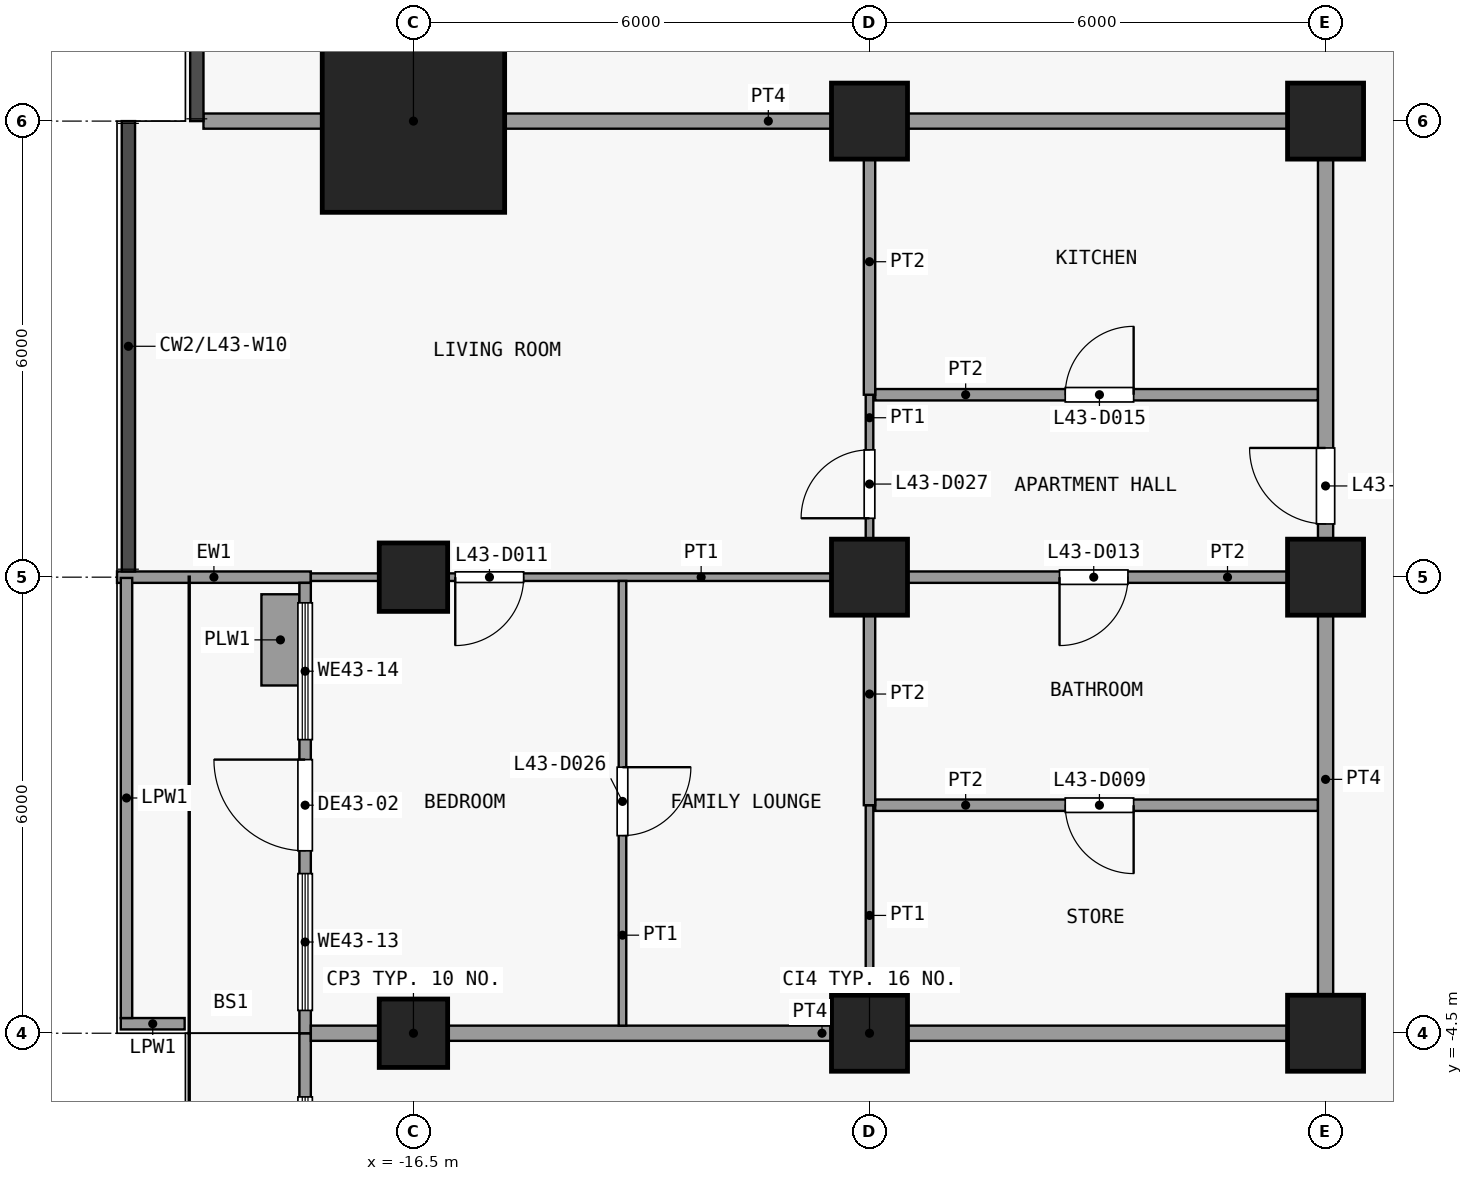
"""IFC4 building model, lengths in metres.
Left out: names, types, materials, properties, quantities, classifications, styles, units other than length and angle.
Written with IfcOpenShell. Run it as: python <this file> out.ifc"""

import sys

from ifc_helpers import new_model, si_unit, direction, frame, frame_2d, origin, origin_2d, place, context, subcontext, project, spatial, rectangle, extrude, element, fill, save


model = new_model("IFC4")
c1 = context("Model", 3, precision=1e-05, world=origin(), true_north=direction((0.0, 1.0)))
c2 = subcontext(c1, "Body", "Model", "MODEL_VIEW")
j1 = project(units=[si_unit("LENGTHUNIT", "METRE"), si_unit("PLANEANGLEUNIT", "RADIAN")], contexts=[c1])
p1 = place(None, origin())
s1 = spatial("IfcSite", under=j1, at=p1, CompositionType="ELEMENT")
p2 = place(p1, origin())
s2 = spatial("IfcBuilding", under=s1, at=p2, CompositionType="ELEMENT")
p3 = place(p2, frame((0.0, 0.0, 174.5)))
s3 = spatial("IfcBuildingStorey", under=s2, at=p3, CompositionType="ELEMENT", Elevation=174.5)
for number, where, z_axis, x_axis in (
    (1, (-16.5, -4.5, 0.0), (0.0, 0.0, 1.0), (1.0, 0.0, 0.0)),
    (2, (-16.5, 1.5, 0.0), (0.0, 0.0, 1.0), (1.0, 0.0, 0.0)),
):
    element("IfcColumn", number, at=place(p3, frame(where, z_axis=z_axis, x_axis=x_axis)), inside=s3, PredefinedType="COLUMN", context=c2, shape_type="SweptSolid", body=[
        extrude(rectangle(XDim=0.9, YDim=0.9, at=origin_2d()), origin(), (0.0, 0.0, 1.0), 3.6),
    ])
p4 = place(p3, frame((-16.5, 7.5, 0.0), z_axis=(0.0, 0.0, 1.0), x_axis=(1.0, 0.0, 0.0)))
e3 = element("IfcColumn", 3, at=p4, inside=s3, PredefinedType="COLUMN", context=c2, shape_type="SweptSolid", body=[
    extrude(rectangle(XDim=2.4, YDim=2.4, at=origin_2d()), origin(), (0.0, 0.0, 1.0), 3.6),
])
for number, where, z_axis, x_axis in (
    (4, (-10.5, -4.5, 0.0), (0.0, 0.0, 1.0), (1.0, 0.0, 0.0)),
    (5, (-10.5, 1.5, 0.0), (0.0, 0.0, 1.0), (1.0, 0.0, 0.0)),
    (6, (-10.5, 7.5, 0.0), (0.0, 0.0, 1.0), (1.0, 0.0, 0.0)),
    (7, (-4.5, -4.5, 0.0), (0.0, 0.0, 1.0), (1.0, 0.0, 0.0)),
    (8, (-4.5, 1.5, 0.0), (0.0, 0.0, 1.0), (1.0, 0.0, 0.0)),
    (9, (-4.5, 7.5, 0.0), (0.0, 0.0, 1.0), (1.0, 0.0, 0.0)),
):
    element("IfcColumn", number, at=place(p3, frame(where, z_axis=z_axis, x_axis=x_axis)), inside=s3, PredefinedType="COLUMN", context=c2, shape_type="SweptSolid", body=[
        extrude(rectangle(XDim=1.0, YDim=1.0, at=origin_2d()), origin(), (0.0, 0.0, 1.0), 3.6),
    ])
p5 = place(p3, frame((-17.925, -13.425, 0.0), z_axis=(0.0, 0.0, 1.0), x_axis=(0.0, 1.0, 0.0)))
e10 = element("IfcWall", 10, at=p5, inside=s3, PredefinedType="SOLIDWALL", context=c2, shape_type="SweptSolid", body=[
    extrude(rectangle(XDim=8.925, YDim=0.15, at=frame_2d((4.462, 0.0))), origin(), (0.0, 0.0, 1.0), 3.3),
])
p6 = place(p5, frame((3.05, 0.0, 0.0)))
e11 = element("IfcOpeningElement", 11, at=p6, cuts=e10, PredefinedType="OPENING", context=c2, shape_type="SweptSolid", body=[
    extrude(rectangle(XDim=1.2, YDim=2.4, at=frame_2d((0.6, 1.2))), frame((0.0, 0.085, 0.0), z_axis=(0.0, -1.0, 0.0), x_axis=(1.0, 0.0, 0.0)), (0.0, 0.0, 1.0), 0.17),
])
p7 = place(p5, frame((0.25, 0.0, 0.9)))
e12 = element("IfcOpeningElement", 12, at=p7, cuts=e10, PredefinedType="OPENING", context=c2, shape_type="SweptSolid", body=[
    extrude(rectangle(XDim=2.05, YDim=2.1, at=frame_2d((1.025, 1.05))), frame((0.0, 0.085, 0.0), z_axis=(0.0, -1.0, 0.0), x_axis=(1.0, 0.0, 0.0)), (0.0, 0.0, 1.0), 0.17),
])
p8 = place(p5, frame((5.775, 0.0, 0.9)))
e13 = element("IfcOpeningElement", 13, at=p8, cuts=e10, PredefinedType="OPENING", context=c2, shape_type="SweptSolid", body=[
    extrude(rectangle(XDim=2.312, YDim=2.1, at=frame_2d((1.156, 1.05))), frame((0.0, 0.085, 0.0), z_axis=(0.0, -1.0, 0.0), x_axis=(1.0, 0.0, 0.0)), (0.0, 0.0, 1.0), 0.17),
])
p9 = place(p3, frame((-17.85, 1.5, 0.0), z_axis=(0.0, 0.0, 1.0), x_axis=(-1.0, 0.0, 0.0)))
e14 = element("IfcWall", 14, at=p9, inside=s3, PredefinedType="SOLIDWALL", context=c2, shape_type="SweptSolid", body=[
    extrude(rectangle(XDim=2.55, YDim=0.15, at=frame_2d((1.275, 0.0))), origin(), (0.0, 0.0, 1.0), 3.3),
])
p10 = place(p3, frame((-17.925, -4.5, 0.0), z_axis=(0.0, 0.0, 1.0), x_axis=(0.0, 1.0, 0.0)))
e15 = element("IfcWall", 15, at=p10, inside=s3, PredefinedType="SOLIDWALL", context=c2, shape_type="SweptSolid", body=[
    extrude(rectangle(XDim=5.925, YDim=0.15, at=frame_2d((2.962, 0.0))), origin(), (0.0, 0.0, 1.0), 3.3),
])
p11 = place(p10, frame((2.4, 0.0, 0.0)))
e16 = element("IfcOpeningElement", 16, at=p11, cuts=e15, PredefinedType="OPENING", context=c2, shape_type="SweptSolid", body=[
    extrude(rectangle(XDim=1.2, YDim=2.4, at=frame_2d((0.6, 1.2))), frame((0.0, 0.085, 0.0), z_axis=(0.0, -1.0, 0.0), x_axis=(1.0, 0.0, 0.0)), (0.0, 0.0, 1.0), 0.17),
])
p12 = place(p10, frame((0.3, 0.0, 0.9)))
e17 = element("IfcOpeningElement", 17, at=p12, cuts=e15, PredefinedType="OPENING", context=c2, shape_type="SweptSolid", body=[
    extrude(rectangle(XDim=1.8, YDim=2.1, at=frame_2d((0.9, 1.05))), frame((0.0, 0.085, 0.0), z_axis=(0.0, -1.0, 0.0), x_axis=(1.0, 0.0, 0.0)), (0.0, 0.0, 1.0), 0.17),
])
p13 = place(p10, frame((3.863, 0.0, 0.9)))
e18 = element("IfcOpeningElement", 18, at=p13, cuts=e15, PredefinedType="OPENING", context=c2, shape_type="SweptSolid", body=[
    extrude(rectangle(XDim=1.8, YDim=2.1, at=frame_2d((0.9, 1.05))), frame((0.0, 0.085, 0.0), z_axis=(0.0, -1.0, 0.0), x_axis=(1.0, 0.0, 0.0)), (0.0, 0.0, 1.0), 0.17),
])
p14 = place(p3, frame((-18.25, 0.075, 0.0), z_axis=(0.0, 0.0, 1.0), x_axis=(0.0, 1.0, 0.0)))
e19 = element("IfcWall", 19, at=p14, inside=s3, PredefinedType="USERDEFINED", context=c2, shape_type="SweptSolid", body=[
    extrude(rectangle(XDim=1.2, YDim=0.5, at=frame_2d((0.6, 0.0))), origin(), (0.0, 0.0, 1.0), 0.9),
])
p15 = place(p3, frame((-19.51, -4.375, 0.0), z_axis=(0.0, 0.0, 1.0), x_axis=(-1.0, 0.0, 0.0)))
e20 = element("IfcWall", 20, at=p15, inside=s3, PredefinedType="PARAPET", context=c2, shape_type="SweptSolid", body=[
    extrude(rectangle(XDim=0.84, YDim=0.15, at=frame_2d((0.42, 0.0))), origin(), (0.0, 0.0, 1.0), 1.15),
])
p16 = place(p3, frame((-20.275, -4.3, 0.0), z_axis=(0.0, 0.0, 1.0), x_axis=(0.0, 1.0, 0.0)))
e21 = element("IfcWall", 21, at=p16, inside=s3, PredefinedType="PARAPET", context=c2, shape_type="SweptSolid", body=[
    extrude(rectangle(XDim=5.79, YDim=0.15, at=frame_2d((2.895, 0.0))), origin(), (0.0, 0.0, 1.0), 1.15),
])
p17 = place(p3, frame((-17.85, -4.5, 0.0), z_axis=(0.0, 0.0, 1.0), x_axis=(1.0, 0.0, 0.0)))
e22 = element("IfcWall", 22, at=p17, inside=s3, PredefinedType="PARTITIONING", context=c2, shape_type="SweptSolid", body=[
    extrude(rectangle(XDim=13.45, YDim=0.2, at=frame_2d((6.725, 0.0))), origin(), (0.0, 0.0, 1.0), 3.3),
])
p18 = place(p3, frame((-10.425, -1.5, 0.0), z_axis=(0.0, 0.0, 1.0), x_axis=(1.0, 0.0, 0.0)))
e23 = element("IfcWall", 23, at=p18, inside=s3, PredefinedType="PARTITIONING", context=c2, shape_type="SweptSolid", body=[
    extrude(rectangle(XDim=5.825, YDim=0.15, at=frame_2d((2.913, 0.0))), origin(), (0.0, 0.0, 1.0), 3.3),
])
p19 = place(p18, frame((2.5, 0.0, 0.0)))
e24 = element("IfcOpeningElement", 24, at=p19, cuts=e23, PredefinedType="OPENING", context=c2, shape_type="SweptSolid", body=[
    extrude(rectangle(XDim=0.9, YDim=2.1, at=frame_2d((0.45, 1.05))), frame((0.0, 0.085, 0.0), z_axis=(0.0, -1.0, 0.0), x_axis=(1.0, 0.0, 0.0)), (0.0, 0.0, 1.0), 0.17),
])
p20 = place(p3, frame((-17.85, 1.5, 0.0), z_axis=(0.0, 0.0, 1.0), x_axis=(1.0, 0.0, 0.0)))
e25 = element("IfcWall", 25, at=p20, inside=s3, PredefinedType="PARTITIONING", context=c2, shape_type="SweptSolid", body=[
    extrude(rectangle(XDim=7.35, YDim=0.1, at=frame_2d((3.675, 0.0))), origin(), (0.0, 0.0, 1.0), 3.3),
])
p21 = place(p20, frame((1.9, 0.0, 0.0)))
e26 = element("IfcOpeningElement", 26, at=p21, cuts=e25, PredefinedType="OPENING", context=c2, shape_type="SweptSolid", body=[
    extrude(rectangle(XDim=0.9, YDim=2.1, at=frame_2d((0.45, 1.05))), frame((0.0, 0.06, 0.0), z_axis=(0.0, -1.0, 0.0), x_axis=(1.0, 0.0, 0.0)), (0.0, 0.0, 1.0), 0.12),
])
p22 = place(p3, frame((-10.5, 1.5, 0.0), z_axis=(0.0, 0.0, 1.0), x_axis=(1.0, 0.0, 0.0)))
e27 = element("IfcWall", 27, at=p22, inside=s3, PredefinedType="PARTITIONING", context=c2, shape_type="SweptSolid", body=[
    extrude(rectangle(XDim=5.9, YDim=0.15, at=frame_2d((2.95, 0.0))), origin(), (0.0, 0.0, 1.0), 3.3),
])
p23 = place(p22, frame((2.5, 0.0, 0.0)))
e28 = element("IfcOpeningElement", 28, at=p23, cuts=e27, PredefinedType="OPENING", context=c2, shape_type="SweptSolid", body=[
    extrude(rectangle(XDim=0.9, YDim=2.1, at=frame_2d((0.45, 1.05))), frame((0.0, 0.085, 0.0), z_axis=(0.0, -1.0, 0.0), x_axis=(1.0, 0.0, 0.0)), (0.0, 0.0, 1.0), 0.17),
])
p24 = place(p3, frame((-10.425, 3.9, 0.0), z_axis=(0.0, 0.0, 1.0), x_axis=(1.0, 0.0, 0.0)))
e29 = element("IfcWall", 29, at=p24, inside=s3, PredefinedType="PARTITIONING", context=c2, shape_type="SweptSolid", body=[
    extrude(rectangle(XDim=5.825, YDim=0.15, at=frame_2d((2.913, 0.0))), origin(), (0.0, 0.0, 1.0), 3.3),
])
p25 = place(p24, frame((2.5, 0.0, 0.0)))
e30 = element("IfcOpeningElement", 30, at=p25, cuts=e29, PredefinedType="OPENING", context=c2, shape_type="SweptSolid", body=[
    extrude(rectangle(XDim=0.9, YDim=2.1, at=frame_2d((0.45, 1.05))), frame((0.0, 0.085, 0.0), z_axis=(0.0, -1.0, 0.0), x_axis=(1.0, 0.0, 0.0)), (0.0, 0.0, 1.0), 0.17),
])
p26 = place(p3, frame((-19.262, 7.5, 0.0), z_axis=(0.0, 0.0, 1.0), x_axis=(1.0, 0.0, 0.0)))
e31 = element("IfcWall", 31, at=p26, inside=s3, PredefinedType="PARTITIONING", context=c2, shape_type="SweptSolid", body=[
    extrude(rectangle(XDim=14.863, YDim=0.2, at=frame_2d((7.431, 0.0))), origin(), (0.0, 0.0, 1.0), 3.3),
])
p27 = place(p3, frame((-13.75, -4.4, 0.0), z_axis=(0.0, 0.0, 1.0), x_axis=(0.0, 1.0, 0.0)))
e32 = element("IfcWall", 32, at=p27, inside=s3, PredefinedType="PARTITIONING", context=c2, shape_type="SweptSolid", body=[
    extrude(rectangle(XDim=5.85, YDim=0.1, at=frame_2d((2.925, 0.0))), origin(), (0.0, 0.0, 1.0), 3.3),
])
p28 = place(p27, frame((2.5, 0.0, 0.0)))
e33 = element("IfcOpeningElement", 33, at=p28, cuts=e32, PredefinedType="OPENING", context=c2, shape_type="SweptSolid", body=[
    extrude(rectangle(XDim=0.9, YDim=2.1, at=frame_2d((0.45, 1.05))), frame((0.0, 0.06, 0.0), z_axis=(0.0, -1.0, 0.0), x_axis=(1.0, 0.0, 0.0)), (0.0, 0.0, 1.0), 0.12),
])
p29 = place(p3, frame((-10.5, -4.4, 0.0), z_axis=(0.0, 0.0, 1.0), x_axis=(0.0, 1.0, 0.0)))
e34 = element("IfcWall", 34, at=p29, inside=s3, PredefinedType="PARTITIONING", context=c2, shape_type="SweptSolid", body=[
    extrude(rectangle(XDim=2.9, YDim=0.1, at=frame_2d((1.45, 0.0))), origin(), (0.0, 0.0, 1.0), 3.3),
])
p30 = place(p3, frame((-10.5, 1.575, 0.0), z_axis=(0.0, 0.0, 1.0), x_axis=(0.0, 1.0, 0.0)))
e35 = element("IfcWall", 35, at=p30, inside=s3, PredefinedType="PARTITIONING", context=c2, shape_type="SweptSolid", body=[
    extrude(rectangle(XDim=2.325, YDim=0.1, at=frame_2d((1.163, 0.0))), origin(), (0.0, 0.0, 1.0), 3.3),
])
p31 = place(p30, frame((0.7, 0.0, 0.0)))
e36 = element("IfcOpeningElement", 36, at=p31, cuts=e35, PredefinedType="OPENING", context=c2, shape_type="SweptSolid", body=[
    extrude(rectangle(XDim=0.9, YDim=2.1, at=frame_2d((0.45, 1.05))), frame((0.0, 0.06, 0.0), z_axis=(0.0, -1.0, 0.0), x_axis=(1.0, 0.0, 0.0)), (0.0, 0.0, 1.0), 0.12),
])
p32 = place(p3, frame((-10.5, -1.5, 0.0), z_axis=(0.0, 0.0, 1.0), x_axis=(0.0, 1.0, 0.0)))
e37 = element("IfcWall", 37, at=p32, inside=s3, PredefinedType="PARTITIONING", context=c2, shape_type="SweptSolid", body=[
    extrude(rectangle(XDim=2.925, YDim=0.15, at=frame_2d((1.462, 0.0))), origin(), (0.0, 0.0, 1.0), 3.3),
])
p33 = place(p3, frame((-10.5, 3.9, 0.0), z_axis=(0.0, 0.0, 1.0), x_axis=(0.0, 1.0, 0.0)))
e38 = element("IfcWall", 38, at=p33, inside=s3, PredefinedType="PARTITIONING", context=c2, shape_type="SweptSolid", body=[
    extrude(rectangle(XDim=3.5, YDim=0.15, at=frame_2d((1.75, 0.0))), origin(), (0.0, 0.0, 1.0), 3.3),
])
p34 = place(p3, frame((-4.5, -4.4, 0.0), z_axis=(0.0, 0.0, 1.0), x_axis=(0.0, 1.0, 0.0)))
e39 = element("IfcWall", 39, at=p34, inside=s3, PredefinedType="PARTITIONING", context=c2, shape_type="SweptSolid", body=[
    extrude(rectangle(XDim=11.8, YDim=0.2, at=frame_2d((5.9, 0.0))), origin(), (0.0, 0.0, 1.0), 3.3),
])
p35 = place(p34, frame((6.6, 0.0, 0.0)))
e40 = element("IfcOpeningElement", 40, at=p35, cuts=e39, PredefinedType="OPENING", context=c2, shape_type="SweptSolid", body=[
    extrude(rectangle(XDim=1.0, YDim=2.1, at=frame_2d((0.5, 1.05))), frame((0.0, 0.11, 0.0), z_axis=(0.0, -1.0, 0.0), x_axis=(1.0, 0.0, 0.0)), (0.0, 0.0, 1.0), 0.22),
])
p36 = place(p8, origin())
e41 = element("IfcWindow", 41, at=p36, inside=s3, PartitioningType="SINGLE_PANEL", PredefinedType="WINDOW", context=c2, shape_type="SweptSolid", body=[
    extrude(rectangle(XDim=2.312, YDim=2.1, at=frame_2d((1.156, 1.05))), frame((0.0, 0.03, 0.0), z_axis=(0.0, -1.0, 0.0), x_axis=(1.0, 0.0, 0.0)), (0.0, 0.0, 1.0), 0.06),
])
fill(e13, e41)
p37 = place(p11, origin())
e42 = element("IfcDoor", 42, at=p37, inside=s3, OperationType="SINGLE_SWING_RIGHT", PredefinedType="DOOR", context=c2, shape_type="SweptSolid", body=[
    extrude(rectangle(XDim=1.2, YDim=2.4, at=frame_2d((0.6, 1.2))), frame((0.0, 0.025, 0.0), z_axis=(0.0, -1.0, 0.0), x_axis=(1.0, 0.0, 0.0)), (0.0, 0.0, 1.0), 0.05),
])
fill(e16, e42)
p38 = place(p12, origin())
e43 = element("IfcWindow", 43, at=p38, inside=s3, PartitioningType="SINGLE_PANEL", PredefinedType="WINDOW", context=c2, shape_type="SweptSolid", body=[
    extrude(rectangle(XDim=1.8, YDim=2.1, at=frame_2d((0.9, 1.05))), frame((0.0, 0.03, 0.0), z_axis=(0.0, -1.0, 0.0), x_axis=(1.0, 0.0, 0.0)), (0.0, 0.0, 1.0), 0.06),
])
fill(e17, e43)
p39 = place(p13, origin())
e44 = element("IfcWindow", 44, at=p39, inside=s3, PartitioningType="SINGLE_PANEL", PredefinedType="WINDOW", context=c2, shape_type="SweptSolid", body=[
    extrude(rectangle(XDim=1.8, YDim=2.1, at=frame_2d((0.9, 1.05))), frame((0.0, 0.03, 0.0), z_axis=(0.0, -1.0, 0.0), x_axis=(1.0, 0.0, 0.0)), (0.0, 0.0, 1.0), 0.06),
])
fill(e18, e44)
p40 = place(p19, origin())
e45 = element("IfcDoor", 45, at=p40, inside=s3, OperationType="SINGLE_SWING_RIGHT", PredefinedType="DOOR", context=c2, shape_type="SweptSolid", body=[
    extrude(rectangle(XDim=0.9, YDim=2.1, at=frame_2d((0.45, 1.05))), frame((0.0, 0.025, 0.0), z_axis=(0.0, -1.0, 0.0), x_axis=(1.0, 0.0, 0.0)), (0.0, 0.0, 1.0), 0.05),
])
fill(e24, e45)
p41 = place(p21, origin())
e46 = element("IfcDoor", 46, at=p41, inside=s3, OperationType="SINGLE_SWING_LEFT", PredefinedType="DOOR", context=c2, shape_type="SweptSolid", body=[
    extrude(rectangle(XDim=0.9, YDim=2.1, at=frame_2d((0.45, 1.05))), frame((0.0, 0.025, 0.0), z_axis=(0.0, -1.0, 0.0), x_axis=(1.0, 0.0, 0.0)), (0.0, 0.0, 1.0), 0.05),
])
fill(e26, e46)
p42 = place(p23, origin())
e47 = element("IfcDoor", 47, at=p42, inside=s3, OperationType="SINGLE_SWING_LEFT", PredefinedType="DOOR", context=c2, shape_type="SweptSolid", body=[
    extrude(rectangle(XDim=0.9, YDim=2.1, at=frame_2d((0.45, 1.05))), frame((0.0, 0.025, 0.0), z_axis=(0.0, -1.0, 0.0), x_axis=(1.0, 0.0, 0.0)), (0.0, 0.0, 1.0), 0.05),
])
fill(e28, e47)
p43 = place(p25, origin())
e48 = element("IfcDoor", 48, at=p43, inside=s3, OperationType="SINGLE_SWING_LEFT", PredefinedType="DOOR", context=c2, shape_type="SweptSolid", body=[
    extrude(rectangle(XDim=0.9, YDim=2.1, at=frame_2d((0.45, 1.05))), frame((0.0, 0.025, 0.0), z_axis=(0.0, -1.0, 0.0), x_axis=(1.0, 0.0, 0.0)), (0.0, 0.0, 1.0), 0.05),
])
fill(e30, e48)
p44 = place(p28, origin())
e49 = element("IfcDoor", 49, at=p44, inside=s3, OperationType="SINGLE_SWING_RIGHT", PredefinedType="DOOR", context=c2, shape_type="SweptSolid", body=[
    extrude(rectangle(XDim=0.9, YDim=2.1, at=frame_2d((0.45, 1.05))), frame((0.0, 0.025, 0.0), z_axis=(0.0, -1.0, 0.0), x_axis=(1.0, 0.0, 0.0)), (0.0, 0.0, 1.0), 0.05),
])
fill(e33, e49)
p45 = place(p31, origin())
e50 = element("IfcDoor", 50, at=p45, inside=s3, OperationType="SINGLE_SWING_RIGHT", PredefinedType="DOOR", context=c2, shape_type="SweptSolid", body=[
    extrude(rectangle(XDim=0.9, YDim=2.1, at=frame_2d((0.45, 1.05))), frame((0.0, 0.025, 0.0), z_axis=(0.0, -1.0, 0.0), x_axis=(1.0, 0.0, 0.0)), (0.0, 0.0, 1.0), 0.05),
])
fill(e36, e50)
p46 = place(p35, origin())
e51 = element("IfcDoor", 51, at=p46, inside=s3, OperationType="SINGLE_SWING_LEFT", PredefinedType="DOOR", context=c2, shape_type="SweptSolid", body=[
    extrude(rectangle(XDim=1.0, YDim=2.1, at=frame_2d((0.5, 1.05))), frame((0.0, 0.025, 0.0), z_axis=(0.0, -1.0, 0.0), x_axis=(1.0, 0.0, 0.0)), (0.0, 0.0, 1.0), 0.05),
])
fill(e40, e51)
save(model, sys.argv[1])
